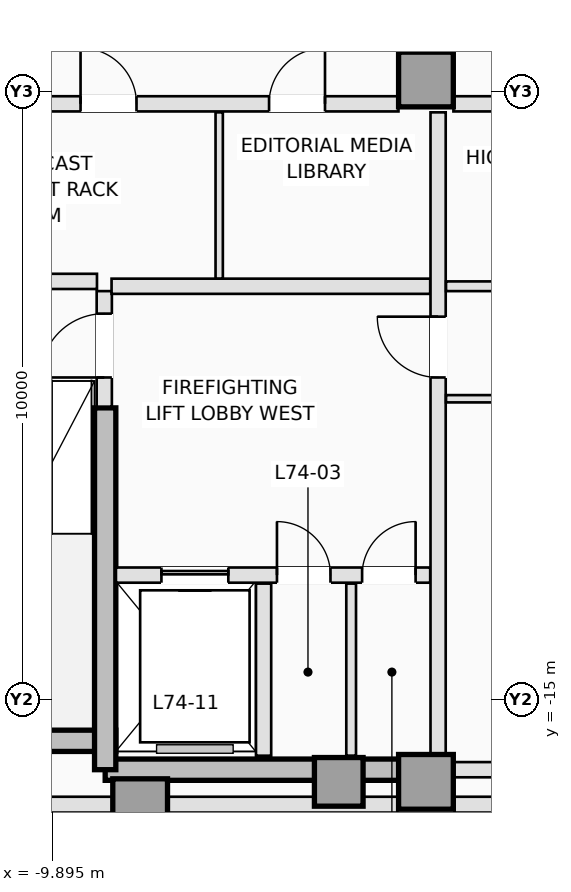
"""IFC4 building model, lengths in metres.
Left out: names, types, materials, properties, quantities, classifications, styles, units other than length and angle.
Written with IfcOpenShell. Run it as: python <this file> out.ifc"""

import sys

from ifc_helpers import new_model, si_unit, direction, frame, frame_2d, origin, origin_2d, place, context, subcontext, project, spatial, rectangle, extrude, element, fill, save


model = new_model("IFC4")
c1 = context("Model", 3, precision=1e-05, world=origin(), true_north=direction((0.0, 1.0)))
c2 = subcontext(c1, "Body", "Model", "MODEL_VIEW")
j1 = project(units=[si_unit("LENGTHUNIT", "METRE"), si_unit("PLANEANGLEUNIT", "RADIAN")], contexts=[c1])
p1 = place(None, origin())
s1 = spatial("IfcSite", under=j1, at=p1, CompositionType="ELEMENT")
p2 = place(p1, origin())
s2 = spatial("IfcBuilding", under=s1, at=p2, CompositionType="ELEMENT")
p3 = place(p2, frame((0.0, 0.0, 267.4)))
s3 = spatial("IfcBuildingStorey", under=s2, at=p3, CompositionType="ELEMENT", Elevation=267.4)
p4 = place(p3, frame((-12.55, -15.675, 0.0), z_axis=(0.0, 0.0, 1.0), x_axis=(1.0, 0.0, 0.0)))
e1 = element("IfcWall", 1, at=p4, inside=s3, PredefinedType="SHEAR", context=c2, shape_type="SweptSolid", body=[
    extrude(rectangle(XDim=3.7, YDim=0.35, at=frame_2d((1.85, 0.0))), origin(), (0.0, 0.0, 1.0), 3.5),
])
p5 = place(p3, frame((-9.025, -16.15, 0.0), z_axis=(0.0, 0.0, 1.0), x_axis=(1.0, 0.0, 0.0)))
e2 = element("IfcWall", 2, at=p5, inside=s3, PredefinedType="SHEAR", context=c2, shape_type="SweptSolid", body=[
    extrude(rectangle(XDim=5.275, YDim=0.35, at=frame_2d((2.637, 0.0))), origin(), (0.0, 0.0, 1.0), 3.5),
])
p6 = place(p3, frame((-9.025, -16.15, 0.0), z_axis=(0.0, 0.0, 1.0), x_axis=(0.0, 1.0, 0.0)))
e3 = element("IfcWall", 3, at=p6, inside=s3, PredefinedType="SHEAR", context=c2, shape_type="SweptSolid", body=[
    extrude(rectangle(XDim=5.95, YDim=0.35, at=frame_2d((2.975, 0.0))), origin(), (0.0, 0.0, 1.0), 3.5),
])
for number, where, z_axis, x_axis in (
    (4, (-8.45, -16.75, 0.0), (0.0, 0.0, 1.0), (1.0, 0.0, 0.0)),
    (5, (-3.75, -16.35, 0.0), (0.0, 0.0, 1.0), (1.0, 0.0, 0.0)),
    (6, (-3.75, -4.8, 0.0), (0.0, 0.0, 1.0), (1.0, 0.0, 0.0)),
):
    element("IfcColumn", number, at=place(p3, frame(where, z_axis=z_axis, x_axis=x_axis)), inside=s3, PredefinedType="COLUMN", context=c2, shape_type="SweptSolid", body=[
        extrude(rectangle(XDim=0.9, YDim=0.9, at=origin_2d()), origin(), (0.0, 0.0, 1.0), 3.5),
    ])
p7 = place(p3, frame((-5.184, -16.35, 0.0), z_axis=(0.0, 0.0, 1.0), x_axis=(0.0, 1.0, 0.0)))
e7 = element("IfcColumn", 7, at=p7, inside=s3, PredefinedType="COLUMN", context=c2, shape_type="SweptSolid", body=[
    extrude(rectangle(XDim=0.8, YDim=0.8, at=origin_2d()), origin(), (0.0, 0.0, 1.0), 3.5),
])
p8 = place(p3, frame((-4.22, -16.725, 0.0), z_axis=(0.0, 0.0, 1.0), x_axis=(-1.0, 0.0, 0.0)))
e8 = element("IfcWall", 8, at=p8, inside=s3, PredefinedType="STANDARD", context=c2, shape_type="SweptSolid", body=[
    extrude(rectangle(XDim=11.273, YDim=0.26, at=frame_2d((5.636, 0.0))), origin(), (0.0, 0.0, 1.0), 2.72),
])
p9 = place(p3, frame((-0.606, -16.725, 0.0), z_axis=(0.0, 0.0, 1.0), x_axis=(-1.0, 0.0, 0.0)))
e9 = element("IfcWall", 9, at=p9, inside=s3, PredefinedType="STANDARD", context=c2, shape_type="SweptSolid", body=[
    extrude(rectangle(XDim=2.674, YDim=0.26, at=frame_2d((1.337, 0.0))), origin(), (0.0, 0.0, 1.0), 3.18),
])
p10 = place(p3, frame((-9.04, -10.18, 0.0), z_axis=(0.0, 0.0, 1.0), x_axis=(0.0, 1.0, 0.0)))
e10 = element("IfcWall", 10, at=p10, inside=s3, PredefinedType="PARTITIONING", context=c2, shape_type="SweptSolid", body=[
    extrude(rectangle(XDim=1.9, YDim=0.25, at=frame_2d((0.95, 0.0))), origin(), (0.0, 0.0, 1.0), 3.18),
])
p11 = place(p10, frame((0.48, 0.0, 0.0)))
e11 = element("IfcOpeningElement", 11, at=p11, cuts=e10, PredefinedType="OPENING", context=c2, shape_type="SweptSolid", body=[
    extrude(rectangle(XDim=1.05, YDim=2.15, at=frame_2d((0.525, 1.075))), frame((0.0, 0.135, 0.0), z_axis=(0.0, -1.0, 0.0), x_axis=(1.0, 0.0, 0.0)), (0.0, 0.0, 1.0), 0.27),
])
p12 = place(p3, frame((-12.38, -8.12, 0.0), z_axis=(0.0, 0.0, 1.0), x_axis=(1.0, 0.0, 0.0)))
e12 = element("IfcWall", 12, at=p12, inside=s3, PredefinedType="PARTITIONING", context=c2, shape_type="SweptSolid", body=[
    extrude(rectangle(XDim=3.22, YDim=0.25, at=frame_2d((1.61, 0.0))), origin(), (0.0, 0.0, 1.0), 3.18),
])
p13 = place(p3, frame((-8.848, -12.95, 0.0), z_axis=(0.0, 0.0, 1.0), x_axis=(1.0, 0.0, 0.0)))
e13 = element("IfcWall", 13, at=p13, inside=s3, PredefinedType="PARTITIONING", context=c2, shape_type="SweptSolid", body=[
    extrude(rectangle(XDim=5.168, YDim=0.25, at=frame_2d((2.584, 0.0))), origin(), (0.0, 0.0, 1.0), 3.18),
])
p14 = place(p13, frame((0.748, 0.0, 0.0)))
e14 = element("IfcOpeningElement", 14, at=p14, cuts=e13, PredefinedType="OPENING", context=c2, shape_type="SweptSolid", body=[
    extrude(rectangle(XDim=1.1, YDim=2.15, at=frame_2d((0.55, 1.075))), frame((0.0, 0.135, 0.0), z_axis=(0.0, -1.0, 0.0), x_axis=(1.0, 0.0, 0.0)), (0.0, 0.0, 1.0), 0.27),
])
p15 = place(p13, frame((2.648, 0.0, 0.0)))
e15 = element("IfcOpeningElement", 15, at=p15, cuts=e13, PredefinedType="OPENING", context=c2, shape_type="SweptSolid", body=[
    extrude(rectangle(XDim=0.88, YDim=2.1, at=frame_2d((0.44, 1.05))), frame((0.0, 0.135, 0.0), z_axis=(0.0, -1.0, 0.0), x_axis=(1.0, 0.0, 0.0)), (0.0, 0.0, 1.0), 0.27),
])
p16 = place(p13, frame((4.048, 0.0, 0.0)))
e16 = element("IfcOpeningElement", 16, at=p16, cuts=e13, PredefinedType="OPENING", context=c2, shape_type="SweptSolid", body=[
    extrude(rectangle(XDim=0.88, YDim=2.1, at=frame_2d((0.44, 1.05))), frame((0.0, 0.135, 0.0), z_axis=(0.0, -1.0, 0.0), x_axis=(1.0, 0.0, 0.0)), (0.0, 0.0, 1.0), 0.27),
])
p17 = place(p3, frame((-6.42, -15.92, 0.0), z_axis=(0.0, 0.0, 1.0), x_axis=(0.0, 1.0, 0.0)))
e17 = element("IfcWall", 17, at=p17, inside=s3, PredefinedType="PARTITIONING", context=c2, shape_type="SweptSolid", body=[
    extrude(rectangle(XDim=2.83, YDim=0.25, at=frame_2d((1.415, 0.0))), origin(), (0.0, 0.0, 1.0), 3.18),
])
p18 = place(p3, frame((-4.98, -15.92, 0.0), z_axis=(0.0, 0.0, 1.0), x_axis=(0.0, 1.0, 0.0)))
e18 = element("IfcWall", 18, at=p18, inside=s3, PredefinedType="PARTITIONING", context=c2, shape_type="SweptSolid", body=[
    extrude(rectangle(XDim=2.83, YDim=0.16, at=frame_2d((1.415, 0.0))), origin(), (0.0, 0.0, 1.0), 3.18),
])
p19 = place(p3, frame((-8.92, -8.2, 0.0), z_axis=(0.0, 0.0, 1.0), x_axis=(1.0, 0.0, 0.0)))
e19 = element("IfcWall", 19, at=p19, inside=s3, PredefinedType="PARTITIONING", context=c2, shape_type="SweptSolid", body=[
    extrude(rectangle(XDim=5.24, YDim=0.25, at=frame_2d((2.62, 0.0))), origin(), (0.0, 0.0, 1.0), 3.18),
])
p20 = place(p3, frame((-3.55, -15.898, 0.0), z_axis=(0.0, 0.0, 1.0), x_axis=(0.0, 1.0, 0.0)))
e20 = element("IfcWall", 20, at=p20, inside=s3, PredefinedType="PARTITIONING", context=c2, shape_type="SweptSolid", body=[
    extrude(rectangle(XDim=10.558, YDim=0.25, at=frame_2d((5.279, 0.0))), origin(), (0.0, 0.0, 1.0), 3.18),
])
p21 = place(p20, frame((6.198, 0.0, 0.0)))
e21 = element("IfcOpeningElement", 21, at=p21, cuts=e20, PredefinedType="OPENING", context=c2, shape_type="SweptSolid", body=[
    extrude(rectangle(XDim=1.0, YDim=2.15, at=frame_2d((0.5, 1.075))), frame((0.0, 0.135, 0.0), z_axis=(0.0, -1.0, 0.0), x_axis=(1.0, 0.0, 0.0)), (0.0, 0.0, 1.0), 0.27),
])
p22 = place(p3, frame((-12.48, -5.2, 0.0), z_axis=(0.0, 0.0, 1.0), x_axis=(1.0, 0.0, 0.0)))
e22 = element("IfcWall", 22, at=p22, inside=s3, PredefinedType="PARTITIONING", context=c2, shape_type="SweptSolid", body=[
    extrude(rectangle(XDim=8.278, YDim=0.25, at=frame_2d((4.139, 0.0))), origin(), (0.0, 0.0, 1.0), 3.18),
])
p23 = place(p22, frame((3.05, 0.0, 0.0)))
e23 = element("IfcOpeningElement", 23, at=p23, cuts=e22, PredefinedType="OPENING", context=c2, shape_type="SweptSolid", body=[
    extrude(rectangle(XDim=0.92, YDim=2.12, at=frame_2d((0.46, 1.06))), frame((0.0, 0.135, 0.0), z_axis=(0.0, -1.0, 0.0), x_axis=(1.0, 0.0, 0.0)), (0.0, 0.0, 1.0), 0.27),
])
p24 = place(p22, frame((6.15, 0.0, 0.0)))
e24 = element("IfcOpeningElement", 24, at=p24, cuts=e22, PredefinedType="OPENING", context=c2, shape_type="SweptSolid", body=[
    extrude(rectangle(XDim=0.92, YDim=2.12, at=frame_2d((0.46, 1.06))), frame((0.0, 0.135, 0.0), z_axis=(0.0, -1.0, 0.0), x_axis=(1.0, 0.0, 0.0)), (0.0, 0.0, 1.0), 0.27),
])
p25 = place(p3, frame((-3.298, -5.2, 0.0), z_axis=(0.0, 0.0, 1.0), x_axis=(1.0, 0.0, 0.0)))
e25 = element("IfcWall", 25, at=p25, inside=s3, PredefinedType="PARTITIONING", context=c2, shape_type="SweptSolid", body=[
    extrude(rectangle(XDim=2.348, YDim=0.25, at=frame_2d((1.174, 0.0))), origin(), (0.0, 0.0, 1.0), 3.18),
])
p26 = place(p3, frame((-7.15, -8.073, 0.0), z_axis=(0.0, 0.0, 1.0), x_axis=(0.0, 1.0, 0.0)))
e26 = element("IfcWall", 26, at=p26, inside=s3, PredefinedType="PARTITIONING", context=c2, shape_type="SweptSolid", body=[
    extrude(rectangle(XDim=2.733, YDim=0.12, at=frame_2d((1.366, 0.0))), origin(), (0.0, 0.0, 1.0), 3.18),
])
p27 = place(p3, frame((-3.298, -16.15, 0.0), z_axis=(0.0, 0.0, 1.0), x_axis=(1.0, 0.0, 0.0)))
e27 = element("IfcWall", 27, at=p27, inside=s3, PredefinedType="PARTITIONING", context=c2, shape_type="SweptSolid", body=[
    extrude(rectangle(XDim=6.596, YDim=0.25, at=frame_2d((3.298, 0.0))), origin(), (0.0, 0.0, 1.0), 2.774),
])
p28 = place(p3, frame((-3.42, -8.2, 0.0), z_axis=(0.0, 0.0, 1.0), x_axis=(1.0, 0.0, 0.0)))
e28 = element("IfcWall", 28, at=p28, inside=s3, PredefinedType="PARTITIONING", context=c2, shape_type="SweptSolid", body=[
    extrude(rectangle(XDim=6.84, YDim=0.16, at=frame_2d((3.42, 0.0))), origin(), (0.0, 0.0, 1.0), 3.18),
])
p29 = place(p28, frame((2.92, 0.0, 0.0)))
e29 = element("IfcOpeningElement", 29, at=p29, cuts=e28, PredefinedType="OPENING", context=c2, shape_type="SweptSolid", body=[
    extrude(rectangle(XDim=1.0, YDim=2.15, at=frame_2d((0.5, 1.075))), frame((0.0, 0.09, 0.0), z_axis=(0.0, -1.0, 0.0), x_axis=(1.0, 0.0, 0.0)), (0.0, 0.0, 1.0), 0.18),
])
p30 = place(p3, frame((-3.42, -10.05, 0.0), z_axis=(0.0, 0.0, 1.0), x_axis=(1.0, 0.0, 0.0)))
e30 = element("IfcWall", 30, at=p30, inside=s3, PredefinedType="PARTITIONING", context=c2, shape_type="SweptSolid", body=[
    extrude(rectangle(XDim=6.84, YDim=0.12, at=frame_2d((3.42, 0.0))), origin(), (0.0, 0.0, 1.0), 3.18),
])
p31 = place(p30, frame((1.85, 0.0, 0.0)))
e31 = element("IfcOpeningElement", 31, at=p31, cuts=e30, PredefinedType="OPENING", context=c2, shape_type="SweptSolid", body=[
    extrude(rectangle(XDim=0.92, YDim=2.12, at=frame_2d((0.46, 1.06))), frame((0.0, 0.07, 0.0), z_axis=(0.0, -1.0, 0.0), x_axis=(1.0, 0.0, 0.0)), (0.0, 0.0, 1.0), 0.14),
])
p32 = place(p30, frame((5.35, 0.0, 0.0)))
e32 = element("IfcOpeningElement", 32, at=p32, cuts=e30, PredefinedType="OPENING", context=c2, shape_type="SweptSolid", body=[
    extrude(rectangle(XDim=0.88, YDim=2.12, at=frame_2d((0.44, 1.06))), frame((0.0, 0.07, 0.0), z_axis=(0.0, -1.0, 0.0), x_axis=(1.0, 0.0, 0.0)), (0.0, 0.0, 1.0), 0.14),
])
p33 = place(p14, origin())
e33 = element("IfcDoor", 33, at=p33, inside=s3, OperationType="SLIDING_TO_LEFT", PredefinedType="DOOR", context=c2, shape_type="SweptSolid", body=[
    extrude(rectangle(XDim=1.1, YDim=2.15, at=frame_2d((0.55, 1.075))), frame((0.0, 0.025, 0.0), z_axis=(0.0, -1.0, 0.0), x_axis=(1.0, 0.0, 0.0)), (0.0, 0.0, 1.0), 0.05),
])
fill(e14, e33)
p34 = place(p11, origin())
e34 = element("IfcDoor", 34, at=p34, inside=s3, OperationType="SINGLE_SWING_LEFT", PredefinedType="DOOR", context=c2, shape_type="SweptSolid", body=[
    extrude(rectangle(XDim=1.05, YDim=2.15, at=frame_2d((0.525, 1.075))), frame((0.0, 0.025, 0.0), z_axis=(0.0, -1.0, 0.0), x_axis=(1.0, 0.0, 0.0)), (0.0, 0.0, 1.0), 0.05),
])
fill(e11, e34)
p35 = place(p15, origin())
e35 = element("IfcDoor", 35, at=p35, inside=s3, OperationType="SINGLE_SWING_LEFT", PredefinedType="TRAPDOOR", context=c2, shape_type="SweptSolid", body=[
    extrude(rectangle(XDim=0.88, YDim=2.1, at=frame_2d((0.44, 1.05))), frame((0.0, 0.025, 0.0), z_axis=(0.0, -1.0, 0.0), x_axis=(1.0, 0.0, 0.0)), (0.0, 0.0, 1.0), 0.05),
])
fill(e15, e35)
p36 = place(p16, origin())
e36 = element("IfcDoor", 36, at=p36, inside=s3, OperationType="SINGLE_SWING_RIGHT", PredefinedType="TRAPDOOR", context=c2, shape_type="SweptSolid", body=[
    extrude(rectangle(XDim=0.88, YDim=2.1, at=frame_2d((0.44, 1.05))), frame((0.0, 0.025, 0.0), z_axis=(0.0, -1.0, 0.0), x_axis=(1.0, 0.0, 0.0)), (0.0, 0.0, 1.0), 0.05),
])
fill(e16, e36)
p37 = place(p21, origin())
e37 = element("IfcDoor", 37, at=p37, inside=s3, OperationType="SINGLE_SWING_RIGHT", PredefinedType="DOOR", context=c2, shape_type="SweptSolid", body=[
    extrude(rectangle(XDim=1.0, YDim=2.15, at=frame_2d((0.5, 1.075))), frame((0.0, 0.025, 0.0), z_axis=(0.0, -1.0, 0.0), x_axis=(1.0, 0.0, 0.0)), (0.0, 0.0, 1.0), 0.05),
])
fill(e21, e37)
p38 = place(p23, origin())
e38 = element("IfcDoor", 38, at=p38, inside=s3, OperationType="SINGLE_SWING_LEFT", PredefinedType="DOOR", context=c2, shape_type="SweptSolid", body=[
    extrude(rectangle(XDim=0.92, YDim=2.12, at=frame_2d((0.46, 1.06))), frame((0.0, 0.025, 0.0), z_axis=(0.0, -1.0, 0.0), x_axis=(1.0, 0.0, 0.0)), (0.0, 0.0, 1.0), 0.05),
])
fill(e23, e38)
p39 = place(p24, origin())
e39 = element("IfcDoor", 39, at=p39, inside=s3, OperationType="SINGLE_SWING_RIGHT", PredefinedType="DOOR", context=c2, shape_type="SweptSolid", body=[
    extrude(rectangle(XDim=0.92, YDim=2.12, at=frame_2d((0.46, 1.06))), frame((0.0, 0.025, 0.0), z_axis=(0.0, -1.0, 0.0), x_axis=(1.0, 0.0, 0.0)), (0.0, 0.0, 1.0), 0.05),
])
fill(e24, e39)
save(model, sys.argv[1])
